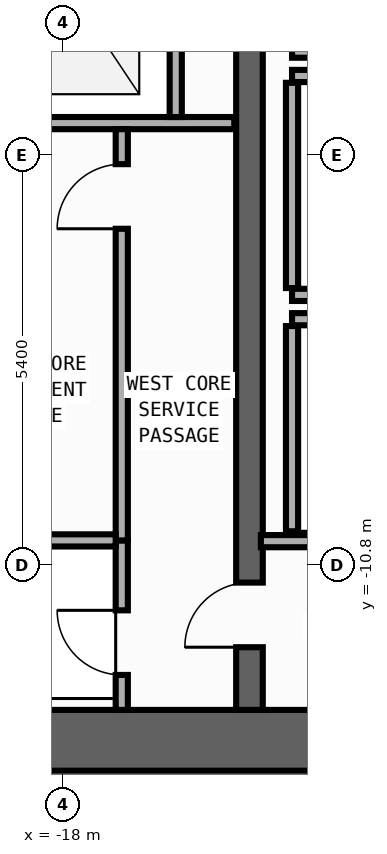
"""IFC4 building model, lengths in metres.
Left out: names, types, materials, properties, quantities, classifications, styles, units other than length and angle.
Written with IfcOpenShell. Run it as: python <this file> out.ifc"""

import sys

from ifc_helpers import new_model, si_unit, direction, frame, frame_2d, origin, place, context, subcontext, project, spatial, rectangle, extrude, element, fill, save


model = new_model("IFC4")
c1 = context("Model", 3, precision=1e-05, world=origin(), true_north=direction((0.0, 1.0)))
c2 = subcontext(c1, "Body", "Model", "MODEL_VIEW")
j1 = project(units=[si_unit("LENGTHUNIT", "METRE"), si_unit("PLANEANGLEUNIT", "RADIAN")], contexts=[c1])
p1 = place(None, origin())
s1 = spatial("IfcSite", under=j1, at=p1, CompositionType="ELEMENT")
p2 = place(p1, origin())
s2 = spatial("IfcBuilding", under=s1, at=p2, CompositionType="ELEMENT")
p3 = place(p2, frame((0.0, 0.0, 16.0)))
s3 = spatial("IfcBuildingStorey", under=s2, at=p3, CompositionType="ELEMENT", Elevation=16.0)
p4 = place(p3, frame((-19.6, -13.1, 0.0), z_axis=(0.0, 0.0, 1.0), x_axis=(1.0, 0.0, 0.0)))
e1 = element("IfcWall", 1, at=p4, inside=s3, PredefinedType="SHEAR", context=c2, shape_type="SweptSolid", body=[
    extrude(rectangle(XDim=6.8, YDim=0.8, at=frame_2d((3.4, 0.0))), origin(), (0.0, 0.0, 1.0), 4.55),
])
p5 = place(p3, frame((-15.55, -12.7, 0.0), z_axis=(0.0, 0.0, 1.0), x_axis=(0.0, 1.0, 0.0)))
e2 = element("IfcWall", 2, at=p5, inside=s3, PredefinedType="SHEAR", context=c2, shape_type="SweptSolid", body=[
    extrude(rectangle(XDim=25.4, YDim=0.35, at=frame_2d((12.7, 0.0))), origin(), (0.0, 0.0, 1.0), 4.55),
])
p6 = place(p5, frame((11.925, 0.0, 0.0)))
e3 = element("IfcOpeningElement", 3, at=p6, cuts=e2, PredefinedType="OPENING", context=c2, shape_type="SweptSolid", body=[
    extrude(rectangle(XDim=1.15, YDim=2.2, at=frame_2d((0.575, 1.1))), frame((0.0, 0.185, 0.0), z_axis=(0.0, -1.0, 0.0), x_axis=(1.0, 0.0, 0.0)), (0.0, 0.0, 1.0), 0.37),
])
p7 = place(p5, frame((0.825, 0.0, 0.0)))
e4 = element("IfcOpeningElement", 4, at=p7, cuts=e2, PredefinedType="OPENING", context=c2, shape_type="SweptSolid", body=[
    extrude(rectangle(XDim=0.85, YDim=2.1, at=frame_2d((0.425, 1.05))), frame((0.0, 0.185, 0.0), z_axis=(0.0, -1.0, 0.0), x_axis=(1.0, 0.0, 0.0)), (0.0, 0.0, 1.0), 0.37),
])
for number, where, z_axis, x_axis in (
    (5, (-14.99, -4.04, 0.0), (0.0, 0.0, 1.0), (1.0, 0.0, 0.0)),
    (6, (-14.99, -7.24, 0.0), (0.0, 0.0, 1.0), (1.0, 0.0, 0.0)),
    (7, (-14.99, -4.36, 0.0), (0.0, 0.0, 1.0), (1.0, 0.0, 0.0)),
):
    element("IfcWall", number, at=place(p3, frame(where, z_axis=z_axis, x_axis=x_axis)), inside=s3, PredefinedType="STANDARD", context=c2, shape_type="SweptSolid", body=[
        extrude(rectangle(XDim=2.19, YDim=0.16, at=frame_2d((1.095, 0.0))), origin(), (0.0, 0.0, 1.0), 4.55),
    ])
p8 = place(p3, frame((-14.99, -7.15, 0.0), z_axis=(0.0, 0.0, 1.0), x_axis=(0.0, 1.0, 0.0)))
e8 = element("IfcWall", 8, at=p8, inside=s3, PredefinedType="STANDARD", context=c2, shape_type="SweptSolid", body=[
    extrude(rectangle(XDim=2.7, YDim=0.16, at=frame_2d((1.35, 0.0))), origin(), (0.0, 0.0, 1.0), 4.55),
])
p9 = place(p3, frame((-14.99, -7.56, 0.0), z_axis=(0.0, 0.0, 1.0), x_axis=(1.0, 0.0, 0.0)))
e9 = element("IfcWall", 9, at=p9, inside=s3, PredefinedType="STANDARD", context=c2, shape_type="SweptSolid", body=[
    extrude(rectangle(XDim=2.19, YDim=0.16, at=frame_2d((1.095, 0.0))), origin(), (0.0, 0.0, 1.0), 4.55),
])
p10 = place(p3, frame((-14.99, -10.35, 0.0), z_axis=(0.0, 0.0, 1.0), x_axis=(0.0, 1.0, 0.0)))
e10 = element("IfcWall", 10, at=p10, inside=s3, PredefinedType="STANDARD", context=c2, shape_type="SweptSolid", body=[
    extrude(rectangle(XDim=2.7, YDim=0.16, at=frame_2d((1.35, 0.0))), origin(), (0.0, 0.0, 1.0), 4.55),
])
p11 = place(p3, frame((-19.55, -4.98, 0.0), z_axis=(0.0, 0.0, 1.0), x_axis=(1.0, 0.0, 0.0)))
e11 = element("IfcWall", 11, at=p11, inside=s3, PredefinedType="STANDARD", context=c2, shape_type="SweptSolid", body=[
    extrude(rectangle(XDim=3.8, YDim=0.16, at=frame_2d((1.9, 0.0))), origin(), (0.0, 0.0, 1.0), 4.55),
])
p12 = place(p3, frame((-16.52, -4.9, 0.0), z_axis=(0.0, 0.0, 1.0), x_axis=(0.0, 1.0, 0.0)))
e12 = element("IfcWall", 12, at=p12, inside=s3, PredefinedType="STANDARD", context=c2, shape_type="SweptSolid", body=[
    extrude(rectangle(XDim=2.96, YDim=0.16, at=frame_2d((1.48, 0.0))), origin(), (0.0, 0.0, 1.0), 4.55),
])
p13 = place(p3, frame((-15.4, -10.48, 0.0), z_axis=(0.0, 0.0, 1.0), x_axis=(1.0, 0.0, 0.0)))
e13 = element("IfcWall", 13, at=p13, inside=s3, PredefinedType="STANDARD", context=c2, shape_type="SweptSolid", body=[
    extrude(rectangle(XDim=2.6, YDim=0.16, at=frame_2d((1.3, 0.0))), origin(), (0.0, 0.0, 1.0), 4.55),
])
p14 = place(p3, frame((-17.23, -12.7, 0.0), z_axis=(0.0, 0.0, 1.0), x_axis=(0.0, 1.0, 0.0)))
e14 = element("IfcWall", 14, at=p14, inside=s3, PredefinedType="PARTITIONING", context=c2, shape_type="SweptSolid", body=[
    extrude(rectangle(XDim=2.23, YDim=0.16, at=frame_2d((1.115, 0.0))), origin(), (0.0, 0.0, 1.0), 4.55),
])
p15 = place(p14, frame((0.46, 0.0, 0.0)))
e15 = element("IfcOpeningElement", 15, at=p15, cuts=e14, PredefinedType="OPENING", context=c2, shape_type="SweptSolid", body=[
    extrude(rectangle(XDim=0.85, YDim=2.1, at=frame_2d((0.425, 1.05))), frame((0.0, 0.09, 0.0), z_axis=(0.0, -1.0, 0.0), x_axis=(1.0, 0.0, 0.0)), (0.0, 0.0, 1.0), 0.18),
])
p16 = place(p3, frame((-17.23, -10.47, 0.0), z_axis=(0.0, 0.0, 1.0), x_axis=(0.0, 1.0, 0.0)))
e16 = element("IfcWall", 16, at=p16, inside=s3, PredefinedType="PARTITIONING", context=c2, shape_type="SweptSolid", body=[
    extrude(rectangle(XDim=5.41, YDim=0.16, at=frame_2d((2.705, 0.0))), origin(), (0.0, 0.0, 1.0), 4.55),
])
p17 = place(p16, frame((4.1, 0.0, 0.0)))
e17 = element("IfcOpeningElement", 17, at=p17, cuts=e16, PredefinedType="OPENING", context=c2, shape_type="SweptSolid", body=[
    extrude(rectangle(XDim=0.85, YDim=2.1, at=frame_2d((0.425, 1.05))), frame((0.0, 0.09, 0.0), z_axis=(0.0, -1.0, 0.0), x_axis=(1.0, 0.0, 0.0)), (0.0, 0.0, 1.0), 0.18),
])
p18 = place(p3, frame((-19.6, -10.47, 0.0), z_axis=(0.0, 0.0, 1.0), x_axis=(1.0, 0.0, 0.0)))
e18 = element("IfcWall", 18, at=p18, inside=s3, PredefinedType="PARTITIONING", context=c2, shape_type="SweptSolid", body=[
    extrude(rectangle(XDim=2.29, YDim=0.16, at=frame_2d((1.145, 0.0))), origin(), (0.0, 0.0, 1.0), 4.55),
])
p19 = place(p7, origin())
e19 = element("IfcDoor", 19, at=p19, inside=s3, OperationType="SINGLE_SWING_LEFT", PredefinedType="DOOR", context=c2, shape_type="SweptSolid", body=[
    extrude(rectangle(XDim=0.85, YDim=2.1, at=frame_2d((0.425, 1.05))), frame((0.0, 0.025, 0.0), z_axis=(0.0, -1.0, 0.0), x_axis=(1.0, 0.0, 0.0)), (0.0, 0.0, 1.0), 0.05),
])
fill(e4, e19)
p20 = place(p15, origin())
e20 = element("IfcDoor", 20, at=p20, inside=s3, OperationType="SINGLE_SWING_RIGHT", PredefinedType="DOOR", context=c2, shape_type="SweptSolid", body=[
    extrude(rectangle(XDim=0.85, YDim=2.1, at=frame_2d((0.425, 1.05))), frame((0.0, 0.025, 0.0), z_axis=(0.0, -1.0, 0.0), x_axis=(1.0, 0.0, 0.0)), (0.0, 0.0, 1.0), 0.05),
])
fill(e15, e20)
p21 = place(p17, origin())
e21 = element("IfcDoor", 21, at=p21, inside=s3, OperationType="SINGLE_SWING_LEFT", PredefinedType="DOOR", context=c2, shape_type="SweptSolid", body=[
    extrude(rectangle(XDim=0.85, YDim=2.1, at=frame_2d((0.425, 1.05))), frame((0.0, 0.025, 0.0), z_axis=(0.0, -1.0, 0.0), x_axis=(1.0, 0.0, 0.0)), (0.0, 0.0, 1.0), 0.05),
])
fill(e17, e21)
save(model, sys.argv[1])
